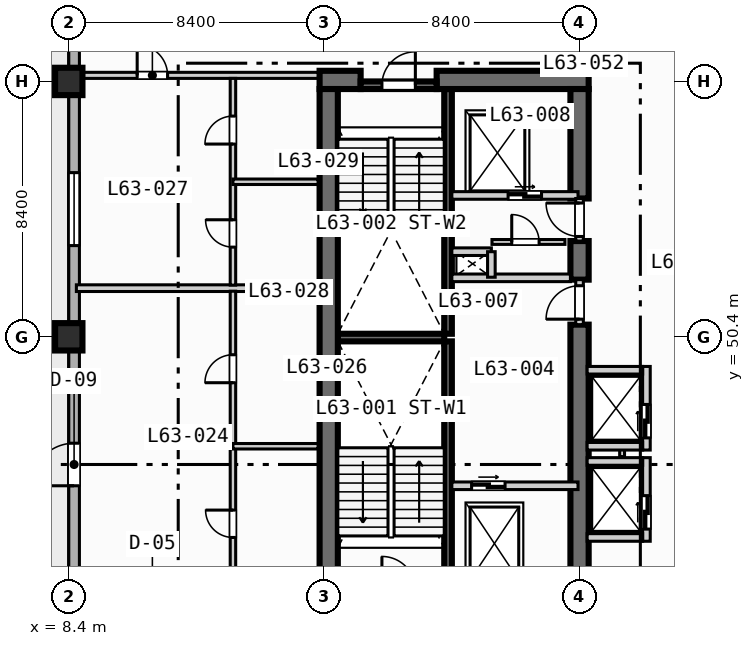
"""IFC4 building model, lengths in metres.
Left out: names, types, materials, properties, quantities, classifications, styles, units other than length and angle.
Written with IfcOpenShell. Run it as: python <this file> out.ifc"""

import sys

from ifc_helpers import new_model, si_unit, direction, frame, frame_2d, origin, origin_2d, place, context, subcontext, project, spatial, rectangle, extrude, element, fill, save


model = new_model("IFC4")
c1 = context("Model", 3, precision=1e-05, world=origin(), true_north=direction((0.0, 1.0)))
c2 = subcontext(c1, "Body", "Model", "MODEL_VIEW")
j1 = project(units=[si_unit("LENGTHUNIT", "METRE"), si_unit("PLANEANGLEUNIT", "RADIAN")], contexts=[c1])
p1 = place(None, origin())
s1 = spatial("IfcSite", under=j1, at=p1, CompositionType="ELEMENT")
p2 = place(p1, origin())
s2 = spatial("IfcBuilding", under=s1, at=p2, CompositionType="ELEMENT")
p3 = place(p2, frame((0.0, 0.0, 256.4)))
s3 = spatial("IfcBuildingStorey", under=s2, at=p3, CompositionType="ELEMENT", Elevation=256.4)
for number, where, z_axis, x_axis in (
    (1, (20.875, 42.2, 0.0), (0.0, 0.0, 1.0), (0.0, 1.0, 0.0)),
    (2, (20.875, 50.5, 0.0), (0.0, 0.0, 1.0), (0.0, 1.0, 0.0)),
):
    element("IfcWall", number, at=place(p3, frame(where, z_axis=z_axis, x_axis=x_axis)), inside=s3, PredefinedType="SOLIDWALL", context=c2, shape_type="SweptSolid", body=[
        extrude(rectangle(XDim=8.05, YDim=0.25, at=frame_2d((4.025, 0.0))), origin(), (0.0, 0.0, 1.0), 3.47),
    ])
p4 = place(p3, frame((17.25, 50.375, 0.0), z_axis=(0.0, 0.0, 1.0), x_axis=(1.0, 0.0, 0.0)))
e3 = element("IfcWall", 3, at=p4, inside=s3, PredefinedType="SOLIDWALL", context=c2, shape_type="SweptSolid", body=[
    extrude(rectangle(XDim=3.5, YDim=0.25, at=frame_2d((1.75, 0.0))), origin(), (0.0, 0.0, 1.0), 3.47),
])
p5 = place(p3, frame((16.65, 58.85, 0.0), z_axis=(0.0, 0.0, 1.0), x_axis=(1.0, 0.0, 0.0)))
e4 = element("IfcWall", 4, at=p5, inside=s3, PredefinedType="SHEAR", context=c2, shape_type="SweptSolid", body=[
    extrude(rectangle(XDim=1.35, YDim=0.6, at=frame_2d((0.675, 0.0))), origin(), (0.0, 0.0, 1.0), 3.47),
])
p6 = place(p3, frame((20.5, 58.85, 0.0), z_axis=(0.0, 0.0, 1.0), x_axis=(1.0, 0.0, 0.0)))
e5 = element("IfcWall", 5, at=p6, inside=s3, PredefinedType="SHEAR", context=c2, shape_type="SweptSolid", body=[
    extrude(rectangle(XDim=5.0, YDim=0.6, at=frame_2d((2.5, 0.0))), origin(), (0.0, 0.0, 1.0), 3.47),
])
p7 = place(p3, frame((16.95, 42.2, 0.0), z_axis=(0.0, 0.0, 1.0), x_axis=(0.0, 1.0, 0.0)))
e6 = element("IfcWall", 6, at=p7, inside=s3, PredefinedType="SHEAR", context=c2, shape_type="SweptSolid", body=[
    extrude(rectangle(XDim=16.35, YDim=0.6, at=frame_2d((8.175, 0.0))), origin(), (0.0, 0.0, 1.0), 3.47),
])
p8 = place(p3, frame((25.2, 42.2, 0.0), z_axis=(0.0, 0.0, 1.0), x_axis=(0.0, 1.0, 0.0)))
e7 = element("IfcWall", 7, at=p8, inside=s3, PredefinedType="SHEAR", context=c2, shape_type="SweptSolid", body=[
    extrude(rectangle(XDim=8.6, YDim=0.6, at=frame_2d((4.3, 0.0))), origin(), (0.0, 0.0, 1.0), 3.47),
])
p9 = place(p3, frame((25.2, 52.28, 0.0), z_axis=(0.0, 0.0, 1.0), x_axis=(0.0, 1.0, 0.0)))
e8 = element("IfcWall", 8, at=p9, inside=s3, PredefinedType="SHEAR", context=c2, shape_type="SweptSolid", body=[
    extrude(rectangle(XDim=1.27, YDim=0.6, at=frame_2d((0.635, 0.0))), origin(), (0.0, 0.0, 1.0), 3.47),
])
p10 = place(p3, frame((25.2, 54.95, 0.0), z_axis=(0.0, 0.0, 1.0), x_axis=(0.0, 1.0, 0.0)))
e9 = element("IfcWall", 9, at=p10, inside=s3, PredefinedType="SHEAR", context=c2, shape_type="SweptSolid", body=[
    extrude(rectangle(XDim=3.6, YDim=0.6, at=frame_2d((1.8, 0.0))), origin(), (0.0, 0.0, 1.0), 3.47),
])
for number, where, z_axis, x_axis in (
    (10, (8.4, 50.4, 0.0), (0.0, 0.0, 1.0), (1.0, 0.0, 0.0)),
    (11, (8.4, 58.8, 0.0), (0.0, 0.0, 1.0), (1.0, 0.0, 0.0)),
):
    element("IfcColumn", number, at=place(p3, frame(where, z_axis=z_axis, x_axis=x_axis)), inside=s3, PredefinedType="COLUMN", context=c2, shape_type="SweptSolid", body=[
        extrude(rectangle(XDim=0.9, YDim=0.9, at=origin_2d()), origin(), (0.0, 0.0, 1.0), 3.7),
    ])
p11 = place(p3, frame((8.575, 11.575, 0.0), z_axis=(0.0, 0.0, 1.0), x_axis=(0.0, 1.0, 0.0)))
e12 = element("IfcWall", 12, at=p11, inside=s3, PredefinedType="STANDARD", context=c2, shape_type="SweptSolid", body=[
    extrude(rectangle(XDim=60.85, YDim=0.35, at=frame_2d((30.425, 0.0))), origin(), (0.0, 0.0, 1.0), 3.47),
])
p12 = place(p11, frame((33.925, 0.0, 0.0)))
e13 = element("IfcOpeningElement", 13, at=p12, cuts=e12, PredefinedType="OPENING", context=c2, shape_type="SweptSolid", body=[
    extrude(rectangle(XDim=1.4, YDim=2.2, at=frame_2d((0.7, 1.1))), frame((0.0, 0.185, 0.0), z_axis=(0.0, -1.0, 0.0), x_axis=(1.0, 0.0, 0.0)), (0.0, 0.0, 1.0), 0.37),
])
p13 = place(p11, frame((16.925, 0.0, 0.85)))
e14 = element("IfcOpeningElement", 14, at=p13, cuts=e12, PredefinedType="OPENING", context=c2, shape_type="SweptSolid", body=[
    extrude(rectangle(XDim=1.8, YDim=1.8, at=frame_2d((0.9, 0.9))), frame((0.0, 0.185, 0.0), z_axis=(0.0, -1.0, 0.0), x_axis=(1.0, 0.0, 0.0)), (0.0, 0.0, 1.0), 0.37),
])
p14 = place(p11, frame((25.025, 0.0, 0.85)))
e15 = element("IfcOpeningElement", 15, at=p14, cuts=e12, PredefinedType="OPENING", context=c2, shape_type="SweptSolid", body=[
    extrude(rectangle(XDim=2.4, YDim=1.95, at=frame_2d((1.2, 0.975))), frame((0.0, 0.185, 0.0), z_axis=(0.0, -1.0, 0.0), x_axis=(1.0, 0.0, 0.0)), (0.0, 0.0, 1.0), 0.37),
])
p15 = place(p11, frame((41.825, 0.0, 0.85)))
e16 = element("IfcOpeningElement", 16, at=p15, cuts=e12, PredefinedType="OPENING", context=c2, shape_type="SweptSolid", body=[
    extrude(rectangle(XDim=2.4, YDim=1.95, at=frame_2d((1.2, 0.975))), frame((0.0, 0.185, 0.0), z_axis=(0.0, -1.0, 0.0), x_axis=(1.0, 0.0, 0.0)), (0.0, 0.0, 1.0), 0.37),
])
p16 = place(p3, frame((18.0, 58.675, 0.0), z_axis=(0.0, 0.0, 1.0), x_axis=(1.0, 0.0, 0.0)))
e17 = element("IfcWall", 17, at=p16, inside=s3, PredefinedType="SOLIDWALL", context=c2, shape_type="SweptSolid", body=[
    extrude(rectangle(XDim=2.5, YDim=0.25, at=frame_2d((1.25, 0.0))), origin(), (0.0, 0.0, 1.0), 3.47),
])
p17 = place(p16, frame((0.7, 0.0, 0.0)))
e18 = element("IfcOpeningElement", 18, at=p17, cuts=e17, PredefinedType="OPENING", context=c2, shape_type="SweptSolid", body=[
    extrude(rectangle(XDim=1.1, YDim=2.15, at=frame_2d((0.55, 1.075))), frame((0.0, 0.135, 0.0), z_axis=(0.0, -1.0, 0.0), x_axis=(1.0, 0.0, 0.0)), (0.0, 0.0, 1.0), 0.27),
])
p18 = place(p3, frame((21.0, 45.5, 0.0), z_axis=(0.0, 0.0, 1.0), x_axis=(1.0, 0.0, 0.0)))
e19 = element("IfcWall", 19, at=p18, inside=s3, PredefinedType="SOLIDWALL", context=c2, shape_type="SweptSolid", body=[
    extrude(rectangle(XDim=4.15, YDim=0.25, at=frame_2d((2.075, 0.0))), origin(), (0.0, 0.0, 1.0), 3.47),
])
p19 = place(p18, frame((0.65, 0.0, 0.0)))
e20 = element("IfcOpeningElement", 20, at=p19, cuts=e19, PredefinedType="OPENING", context=c2, shape_type="SweptSolid", body=[
    extrude(rectangle(XDim=1.1, YDim=2.15, at=frame_2d((0.55, 1.075))), frame((0.0, 0.135, 0.0), z_axis=(0.0, -1.0, 0.0), x_axis=(1.0, 0.0, 0.0)), (0.0, 0.0, 1.0), 0.27),
])
p20 = place(p3, frame((25.2, 50.8, 0.0), z_axis=(0.0, 0.0, 1.0), x_axis=(0.0, 1.0, 0.0)))
e21 = element("IfcWall", 21, at=p20, inside=s3, PredefinedType="SOLIDWALL", context=c2, shape_type="SweptSolid", body=[
    extrude(rectangle(XDim=1.48, YDim=0.25, at=frame_2d((0.74, 0.0))), origin(), (0.0, 0.0, 1.0), 3.47),
])
p21 = place(p20, frame((0.18, 0.0, 0.0)))
e22 = element("IfcOpeningElement", 22, at=p21, cuts=e21, PredefinedType="OPENING", context=c2, shape_type="SweptSolid", body=[
    extrude(rectangle(XDim=1.1, YDim=2.15, at=frame_2d((0.55, 1.075))), frame((0.0, 0.135, 0.0), z_axis=(0.0, -1.0, 0.0), x_axis=(1.0, 0.0, 0.0)), (0.0, 0.0, 1.0), 0.27),
])
p22 = place(p3, frame((21.0, 52.34, 0.0), z_axis=(0.0, 0.0, 1.0), x_axis=(1.0, 0.0, 0.0)))
e23 = element("IfcWall", 23, at=p22, inside=s3, PredefinedType="SOLIDWALL", context=c2, shape_type="SweptSolid", body=[
    extrude(rectangle(XDim=3.9, YDim=0.25, at=frame_2d((1.95, 0.0))), origin(), (0.0, 0.0, 1.0), 3.47),
])
p23 = place(p3, frame((21.0, 55.05, 0.0), z_axis=(0.0, 0.0, 1.0), x_axis=(1.0, 0.0, 0.0)))
e24 = element("IfcWall", 24, at=p23, inside=s3, PredefinedType="SOLIDWALL", context=c2, shape_type="SweptSolid", body=[
    extrude(rectangle(XDim=4.15, YDim=0.25, at=frame_2d((2.075, 0.0))), origin(), (0.0, 0.0, 1.0), 3.47),
])
p24 = place(p23, frame((1.85, 0.0, 0.0)))
e25 = element("IfcOpeningElement", 25, at=p24, cuts=e24, PredefinedType="OPENING", context=c2, shape_type="SweptSolid", body=[
    extrude(rectangle(XDim=1.1, YDim=2.15, at=frame_2d((0.55, 1.075))), frame((0.0, 0.135, 0.0), z_axis=(0.0, -1.0, 0.0), x_axis=(1.0, 0.0, 0.0)), (0.0, 0.0, 1.0), 0.27),
])
p25 = place(p3, frame((25.2, 53.55, 0.0), z_axis=(0.0, 0.0, 1.0), x_axis=(0.0, 1.0, 0.0)))
e26 = element("IfcWall", 26, at=p25, inside=s3, PredefinedType="SOLIDWALL", context=c2, shape_type="SweptSolid", body=[
    extrude(rectangle(XDim=1.4, YDim=0.25, at=frame_2d((0.7, 0.0))), origin(), (0.0, 0.0, 1.0), 3.47),
])
p26 = place(p25, frame((0.15, 0.0, 0.0)))
e27 = element("IfcOpeningElement", 27, at=p26, cuts=e26, PredefinedType="OPENING", context=c2, shape_type="SweptSolid", body=[
    extrude(rectangle(XDim=1.1, YDim=2.15, at=frame_2d((0.55, 1.075))), frame((0.0, 0.135, 0.0), z_axis=(0.0, -1.0, 0.0), x_axis=(1.0, 0.0, 0.0)), (0.0, 0.0, 1.0), 0.27),
])
p27 = place(p3, frame((21.0, 53.2, 0.0), z_axis=(0.0, 0.0, 1.0), x_axis=(1.0, 0.0, 0.0)))
e28 = element("IfcWall", 28, at=p27, inside=s3, PredefinedType="SOLIDWALL", context=c2, shape_type="SweptSolid", body=[
    extrude(rectangle(XDim=1.3, YDim=0.25, at=frame_2d((0.65, 0.0))), origin(), (0.0, 0.0, 1.0), 3.47),
])
p28 = place(p3, frame((22.3, 52.36, 0.0), z_axis=(0.0, 0.0, 1.0), x_axis=(0.0, 1.0, 0.0)))
e29 = element("IfcWall", 29, at=p28, inside=s3, PredefinedType="SOLIDWALL", context=c2, shape_type="SweptSolid", body=[
    extrude(rectangle(XDim=0.84, YDim=0.25, at=frame_2d((0.42, 0.0))), origin(), (0.0, 0.0, 1.0), 3.47),
])
p29 = place(p3, frame((22.32, 53.52, 0.0), z_axis=(0.0, 0.0, 1.0), x_axis=(1.0, 0.0, 0.0)))
e30 = element("IfcWall", 30, at=p29, inside=s3, PredefinedType="PARTITIONING", context=c2, shape_type="SweptSolid", body=[
    extrude(rectangle(XDim=2.4, YDim=0.16, at=frame_2d((1.2, 0.0))), origin(), (0.0, 0.0, 1.0), 3.47),
])
p30 = place(p29, frame((0.65, 0.0, 0.0)))
e31 = element("IfcOpeningElement", 31, at=p30, cuts=e30, PredefinedType="OPENING", context=c2, shape_type="SweptSolid", body=[
    extrude(rectangle(XDim=0.9, YDim=2.1, at=frame_2d((0.45, 1.05))), frame((0.0, 0.09, 0.0), z_axis=(0.0, -1.0, 0.0), x_axis=(1.0, 0.0, 0.0)), (0.0, 0.0, 1.0), 0.18),
])
p31 = place(p3, frame((27.4, 43.675, 0.0), z_axis=(0.0, 0.0, 1.0), x_axis=(0.0, 1.0, 0.0)))
e32 = element("IfcWall", 32, at=p31, inside=s3, PredefinedType="SOLIDWALL", context=c2, shape_type="SweptSolid", body=[
    extrude(rectangle(XDim=2.75, YDim=0.25, at=frame_2d((1.375, 0.0))), origin(), (0.0, 0.0, 1.0), 3.47),
])
p32 = place(p31, frame((0.4, 0.0, 0.0)))
e33 = element("IfcOpeningElement", 33, at=p32, cuts=e32, PredefinedType="OPENING", context=c2, shape_type="SweptSolid", body=[
    extrude(rectangle(XDim=1.1, YDim=2.15, at=frame_2d((0.55, 1.075))), frame((0.0, 0.135, 0.0), z_axis=(0.0, -1.0, 0.0), x_axis=(1.0, 0.0, 0.0)), (0.0, 0.0, 1.0), 0.27),
])
for number, where, z_axis, x_axis in (
    (34, (25.45, 43.8, 0.0), (0.0, 0.0, 1.0), (1.0, 0.0, 0.0)),
    (35, (25.45, 46.3, 0.0), (0.0, 0.0, 1.0), (1.0, 0.0, 0.0)),
):
    element("IfcWall", number, at=place(p3, frame(where, z_axis=z_axis, x_axis=x_axis)), inside=s3, PredefinedType="SOLIDWALL", context=c2, shape_type="SweptSolid", body=[
        extrude(rectangle(XDim=1.825, YDim=0.25, at=frame_2d((0.913, 0.0))), origin(), (0.0, 0.0, 1.0), 3.47),
    ])
p33 = place(p3, frame((26.6, 46.46, 0.0), z_axis=(0.0, 0.0, 1.0), x_axis=(0.0, 1.0, 0.0)))
e36 = element("IfcWall", 36, at=p33, inside=s3, PredefinedType="PARTITIONING", context=c2, shape_type="SweptSolid", body=[
    extrude(rectangle(XDim=0.88, YDim=0.16, at=frame_2d((0.44, 0.0))), origin(), (0.0, 0.0, 1.0), 3.47),
])
p34 = place(p3, frame((27.4, 46.675, 0.0), z_axis=(0.0, 0.0, 1.0), x_axis=(0.0, 1.0, 0.0)))
e37 = element("IfcWall", 37, at=p34, inside=s3, PredefinedType="SOLIDWALL", context=c2, shape_type="SweptSolid", body=[
    extrude(rectangle(XDim=2.75, YDim=0.25, at=frame_2d((1.375, 0.0))), origin(), (0.0, 0.0, 1.0), 3.47),
])
p35 = place(p34, frame((0.4, 0.0, 0.0)))
e38 = element("IfcOpeningElement", 38, at=p35, cuts=e37, PredefinedType="OPENING", context=c2, shape_type="SweptSolid", body=[
    extrude(rectangle(XDim=1.1, YDim=2.15, at=frame_2d((0.55, 1.075))), frame((0.0, 0.135, 0.0), z_axis=(0.0, -1.0, 0.0), x_axis=(1.0, 0.0, 0.0)), (0.0, 0.0, 1.0), 0.27),
])
for number, where, z_axis, x_axis in (
    (39, (25.45, 46.8, 0.0), (0.0, 0.0, 1.0), (1.0, 0.0, 0.0)),
    (40, (25.45, 49.3, 0.0), (0.0, 0.0, 1.0), (1.0, 0.0, 0.0)),
):
    element("IfcWall", number, at=place(p3, frame(where, z_axis=z_axis, x_axis=x_axis)), inside=s3, PredefinedType="SOLIDWALL", context=c2, shape_type="SweptSolid", body=[
        extrude(rectangle(XDim=1.825, YDim=0.25, at=frame_2d((0.913, 0.0))), origin(), (0.0, 0.0, 1.0), 3.47),
    ])
p36 = place(p3, frame((8.65, 59.0, 0.0), z_axis=(0.0, 0.0, 1.0), x_axis=(1.0, 0.0, 0.0)))
e41 = element("IfcWall", 41, at=p36, inside=s3, PredefinedType="PARTITIONING", context=c2, shape_type="SweptSolid", body=[
    extrude(rectangle(XDim=7.95, YDim=0.2, at=frame_2d((3.975, 0.0))), origin(), (0.0, 0.0, 1.0), 2.927),
])
p37 = place(p36, frame((2.0, 0.0, 0.0)))
e42 = element("IfcOpeningElement", 42, at=p37, cuts=e41, PredefinedType="OPENING", context=c2, shape_type="SweptSolid", body=[
    extrude(rectangle(XDim=1.0, YDim=2.15, at=frame_2d((0.5, 1.075))), frame((0.0, 0.11, 0.0), z_axis=(0.0, -1.0, 0.0), x_axis=(1.0, 0.0, 0.0)), (0.0, 0.0, 1.0), 0.22),
])
p38 = place(p3, frame((8.65, 52.0, 0.0), z_axis=(0.0, 0.0, 1.0), x_axis=(1.0, 0.0, 0.0)))
e43 = element("IfcWall", 43, at=p38, inside=s3, PredefinedType="PARTITIONING", context=c2, shape_type="SweptSolid", body=[
    extrude(rectangle(XDim=7.95, YDim=0.22, at=frame_2d((3.975, 0.0))), origin(), (0.0, 0.0, 1.0), 3.47),
])
p39 = place(p3, frame((13.8, 41.7, 0.0), z_axis=(0.0, 0.0, 1.0), x_axis=(0.0, 1.0, 0.0)))
e44 = element("IfcWall", 44, at=p39, inside=s3, PredefinedType="PLUMBINGWALL", context=c2, shape_type="SweptSolid", body=[
    extrude(rectangle(XDim=10.2, YDim=0.18, at=frame_2d((5.1, 0.0))), origin(), (0.0, 0.0, 1.0), 3.47),
])
p40 = place(p39, frame((2.1, 0.0, 0.0)))
e45 = element("IfcOpeningElement", 45, at=p40, cuts=e44, PredefinedType="OPENING", context=c2, shape_type="SweptSolid", body=[
    extrude(rectangle(XDim=0.9, YDim=2.1, at=frame_2d((0.45, 1.05))), frame((0.0, 0.1, 0.0), z_axis=(0.0, -1.0, 0.0), x_axis=(1.0, 0.0, 0.0)), (0.0, 0.0, 1.0), 0.2),
])
p41 = place(p39, frame((7.19, 0.0, 0.0)))
e46 = element("IfcOpeningElement", 46, at=p41, cuts=e44, PredefinedType="OPENING", context=c2, shape_type="SweptSolid", body=[
    extrude(rectangle(XDim=0.92, YDim=2.1, at=frame_2d((0.46, 1.05))), frame((0.0, 0.1, 0.0), z_axis=(0.0, -1.0, 0.0), x_axis=(1.0, 0.0, 0.0)), (0.0, 0.0, 1.0), 0.2),
])
p42 = place(p3, frame((13.8, 46.8, 0.0), z_axis=(0.0, 0.0, 1.0), x_axis=(1.0, 0.0, 0.0)))
e47 = element("IfcWall", 47, at=p42, inside=s3, PredefinedType="PLUMBINGWALL", context=c2, shape_type="SweptSolid", body=[
    extrude(rectangle(XDim=2.8, YDim=0.18, at=frame_2d((1.4, 0.0))), origin(), (0.0, 0.0, 1.0), 3.47),
])
p43 = place(p3, frame((13.8, 52.1, 0.0), z_axis=(0.0, 0.0, 1.0), x_axis=(0.0, 1.0, 0.0)))
e48 = element("IfcWall", 48, at=p43, inside=s3, PredefinedType="PLUMBINGWALL", context=c2, shape_type="SweptSolid", body=[
    extrude(rectangle(XDim=6.8, YDim=0.18, at=frame_2d((3.4, 0.0))), origin(), (0.0, 0.0, 1.0), 3.47),
])
p44 = place(p43, frame((1.25, 0.0, 0.0)))
e49 = element("IfcOpeningElement", 49, at=p44, cuts=e48, PredefinedType="OPENING", context=c2, shape_type="SweptSolid", body=[
    extrude(rectangle(XDim=0.9, YDim=2.1, at=frame_2d((0.45, 1.05))), frame((0.0, 0.1, 0.0), z_axis=(0.0, -1.0, 0.0), x_axis=(1.0, 0.0, 0.0)), (0.0, 0.0, 1.0), 0.2),
])
p45 = place(p43, frame((4.64, 0.0, 0.0)))
e50 = element("IfcOpeningElement", 50, at=p45, cuts=e48, PredefinedType="OPENING", context=c2, shape_type="SweptSolid", body=[
    extrude(rectangle(XDim=0.92, YDim=2.1, at=frame_2d((0.46, 1.05))), frame((0.0, 0.1, 0.0), z_axis=(0.0, -1.0, 0.0), x_axis=(1.0, 0.0, 0.0)), (0.0, 0.0, 1.0), 0.2),
])
p46 = place(p3, frame((13.8, 55.5, 0.0), z_axis=(0.0, 0.0, 1.0), x_axis=(1.0, 0.0, 0.0)))
e51 = element("IfcWall", 51, at=p46, inside=s3, PredefinedType="PLUMBINGWALL", context=c2, shape_type="SweptSolid", body=[
    extrude(rectangle(XDim=2.8, YDim=0.18, at=frame_2d((1.4, 0.0))), origin(), (0.0, 0.0, 1.0), 3.47),
])
p47 = place(p12, origin())
e52 = element("IfcDoor", 52, at=p47, inside=s3, OperationType="SINGLE_SWING_LEFT", PredefinedType="DOOR", context=c2, shape_type="SweptSolid", body=[
    extrude(rectangle(XDim=1.4, YDim=2.2, at=frame_2d((0.7, 1.1))), frame((0.0, 0.025, 0.0), z_axis=(0.0, -1.0, 0.0), x_axis=(1.0, 0.0, 0.0)), (0.0, 0.0, 1.0), 0.05),
])
fill(e13, e52)
p48 = place(p15, origin())
e53 = element("IfcWindow", 53, at=p48, inside=s3, PartitioningType="SINGLE_PANEL", PredefinedType="WINDOW", context=c2, shape_type="SweptSolid", body=[
    extrude(rectangle(XDim=2.4, YDim=1.95, at=frame_2d((1.2, 0.975))), frame((0.0, 0.03, 0.0), z_axis=(0.0, -1.0, 0.0), x_axis=(1.0, 0.0, 0.0)), (0.0, 0.0, 1.0), 0.06),
])
fill(e16, e53)
p49 = place(p17, origin())
e54 = element("IfcDoor", 54, at=p49, inside=s3, OperationType="SINGLE_SWING_RIGHT", PredefinedType="DOOR", context=c2, shape_type="SweptSolid", body=[
    extrude(rectangle(XDim=1.1, YDim=2.15, at=frame_2d((0.55, 1.075))), frame((0.0, 0.025, 0.0), z_axis=(0.0, -1.0, 0.0), x_axis=(1.0, 0.0, 0.0)), (0.0, 0.0, 1.0), 0.05),
])
fill(e18, e54)
p50 = place(p19, origin())
e55 = element("IfcDoor", 55, at=p50, inside=s3, OperationType="SLIDING_TO_LEFT", PredefinedType="DOOR", context=c2, shape_type="SweptSolid", body=[
    extrude(rectangle(XDim=1.1, YDim=2.15, at=frame_2d((0.55, 1.075))), frame((0.0, 0.025, 0.0), z_axis=(0.0, -1.0, 0.0), x_axis=(1.0, 0.0, 0.0)), (0.0, 0.0, 1.0), 0.05),
])
fill(e20, e55)
p51 = place(p21, origin())
e56 = element("IfcDoor", 56, at=p51, inside=s3, OperationType="SINGLE_SWING_LEFT", PredefinedType="DOOR", context=c2, shape_type="SweptSolid", body=[
    extrude(rectangle(XDim=1.1, YDim=2.15, at=frame_2d((0.55, 1.075))), frame((0.0, 0.025, 0.0), z_axis=(0.0, -1.0, 0.0), x_axis=(1.0, 0.0, 0.0)), (0.0, 0.0, 1.0), 0.05),
])
fill(e22, e56)
p52 = place(p24, origin())
e57 = element("IfcDoor", 57, at=p52, inside=s3, OperationType="SLIDING_TO_LEFT", PredefinedType="DOOR", context=c2, shape_type="SweptSolid", body=[
    extrude(rectangle(XDim=1.1, YDim=2.15, at=frame_2d((0.55, 1.075))), frame((0.0, 0.025, 0.0), z_axis=(0.0, -1.0, 0.0), x_axis=(1.0, 0.0, 0.0)), (0.0, 0.0, 1.0), 0.05),
])
fill(e25, e57)
p53 = place(p26, origin())
e58 = element("IfcDoor", 58, at=p53, inside=s3, OperationType="SINGLE_SWING_RIGHT", PredefinedType="DOOR", context=c2, shape_type="SweptSolid", body=[
    extrude(rectangle(XDim=1.1, YDim=2.15, at=frame_2d((0.55, 1.075))), frame((0.0, 0.025, 0.0), z_axis=(0.0, -1.0, 0.0), x_axis=(1.0, 0.0, 0.0)), (0.0, 0.0, 1.0), 0.05),
])
fill(e27, e58)
p54 = place(p30, origin())
e59 = element("IfcDoor", 59, at=p54, inside=s3, OperationType="SINGLE_SWING_LEFT", PredefinedType="DOOR", context=c2, shape_type="SweptSolid", body=[
    extrude(rectangle(XDim=0.9, YDim=2.1, at=frame_2d((0.45, 1.05))), frame((0.0, 0.025, 0.0), z_axis=(0.0, -1.0, 0.0), x_axis=(1.0, 0.0, 0.0)), (0.0, 0.0, 1.0), 0.05),
])
fill(e31, e59)
p55 = place(p32, origin())
e60 = element("IfcDoor", 60, at=p55, inside=s3, OperationType="SLIDING_TO_LEFT", PredefinedType="DOOR", context=c2, shape_type="SweptSolid", body=[
    extrude(rectangle(XDim=1.1, YDim=2.15, at=frame_2d((0.55, 1.075))), frame((0.0, 0.025, 0.0), z_axis=(0.0, -1.0, 0.0), x_axis=(1.0, 0.0, 0.0)), (0.0, 0.0, 1.0), 0.05),
])
fill(e33, e60)
p56 = place(p35, origin())
e61 = element("IfcDoor", 61, at=p56, inside=s3, OperationType="SLIDING_TO_LEFT", PredefinedType="DOOR", context=c2, shape_type="SweptSolid", body=[
    extrude(rectangle(XDim=1.1, YDim=2.15, at=frame_2d((0.55, 1.075))), frame((0.0, 0.025, 0.0), z_axis=(0.0, -1.0, 0.0), x_axis=(1.0, 0.0, 0.0)), (0.0, 0.0, 1.0), 0.05),
])
fill(e38, e61)
p57 = place(p37, origin())
e62 = element("IfcDoor", 62, at=p57, inside=s3, OperationType="SINGLE_SWING_LEFT", PredefinedType="DOOR", context=c2, shape_type="SweptSolid", body=[
    extrude(rectangle(XDim=1.0, YDim=2.15, at=frame_2d((0.5, 1.075))), frame((0.0, 0.025, 0.0), z_axis=(0.0, -1.0, 0.0), x_axis=(1.0, 0.0, 0.0)), (0.0, 0.0, 1.0), 0.05),
])
fill(e42, e62)
p58 = place(p40, origin())
e63 = element("IfcDoor", 63, at=p58, inside=s3, OperationType="SINGLE_SWING_RIGHT", PredefinedType="DOOR", context=c2, shape_type="SweptSolid", body=[
    extrude(rectangle(XDim=0.9, YDim=2.1, at=frame_2d((0.45, 1.05))), frame((0.0, 0.025, 0.0), z_axis=(0.0, -1.0, 0.0), x_axis=(1.0, 0.0, 0.0)), (0.0, 0.0, 1.0), 0.05),
])
fill(e45, e63)
p59 = place(p41, origin())
e64 = element("IfcDoor", 64, at=p59, inside=s3, OperationType="SINGLE_SWING_LEFT", PredefinedType="DOOR", context=c2, shape_type="SweptSolid", body=[
    extrude(rectangle(XDim=0.92, YDim=2.1, at=frame_2d((0.46, 1.05))), frame((0.0, 0.025, 0.0), z_axis=(0.0, -1.0, 0.0), x_axis=(1.0, 0.0, 0.0)), (0.0, 0.0, 1.0), 0.05),
])
fill(e46, e64)
p60 = place(p44, origin())
e65 = element("IfcDoor", 65, at=p60, inside=s3, OperationType="SINGLE_SWING_RIGHT", PredefinedType="DOOR", context=c2, shape_type="SweptSolid", body=[
    extrude(rectangle(XDim=0.9, YDim=2.1, at=frame_2d((0.45, 1.05))), frame((0.0, 0.025, 0.0), z_axis=(0.0, -1.0, 0.0), x_axis=(1.0, 0.0, 0.0)), (0.0, 0.0, 1.0), 0.05),
])
fill(e49, e65)
p61 = place(p45, origin())
e66 = element("IfcDoor", 66, at=p61, inside=s3, OperationType="SINGLE_SWING_LEFT", PredefinedType="DOOR", context=c2, shape_type="SweptSolid", body=[
    extrude(rectangle(XDim=0.92, YDim=2.1, at=frame_2d((0.46, 1.05))), frame((0.0, 0.025, 0.0), z_axis=(0.0, -1.0, 0.0), x_axis=(1.0, 0.0, 0.0)), (0.0, 0.0, 1.0), 0.05),
])
fill(e50, e66)
save(model, sys.argv[1])
